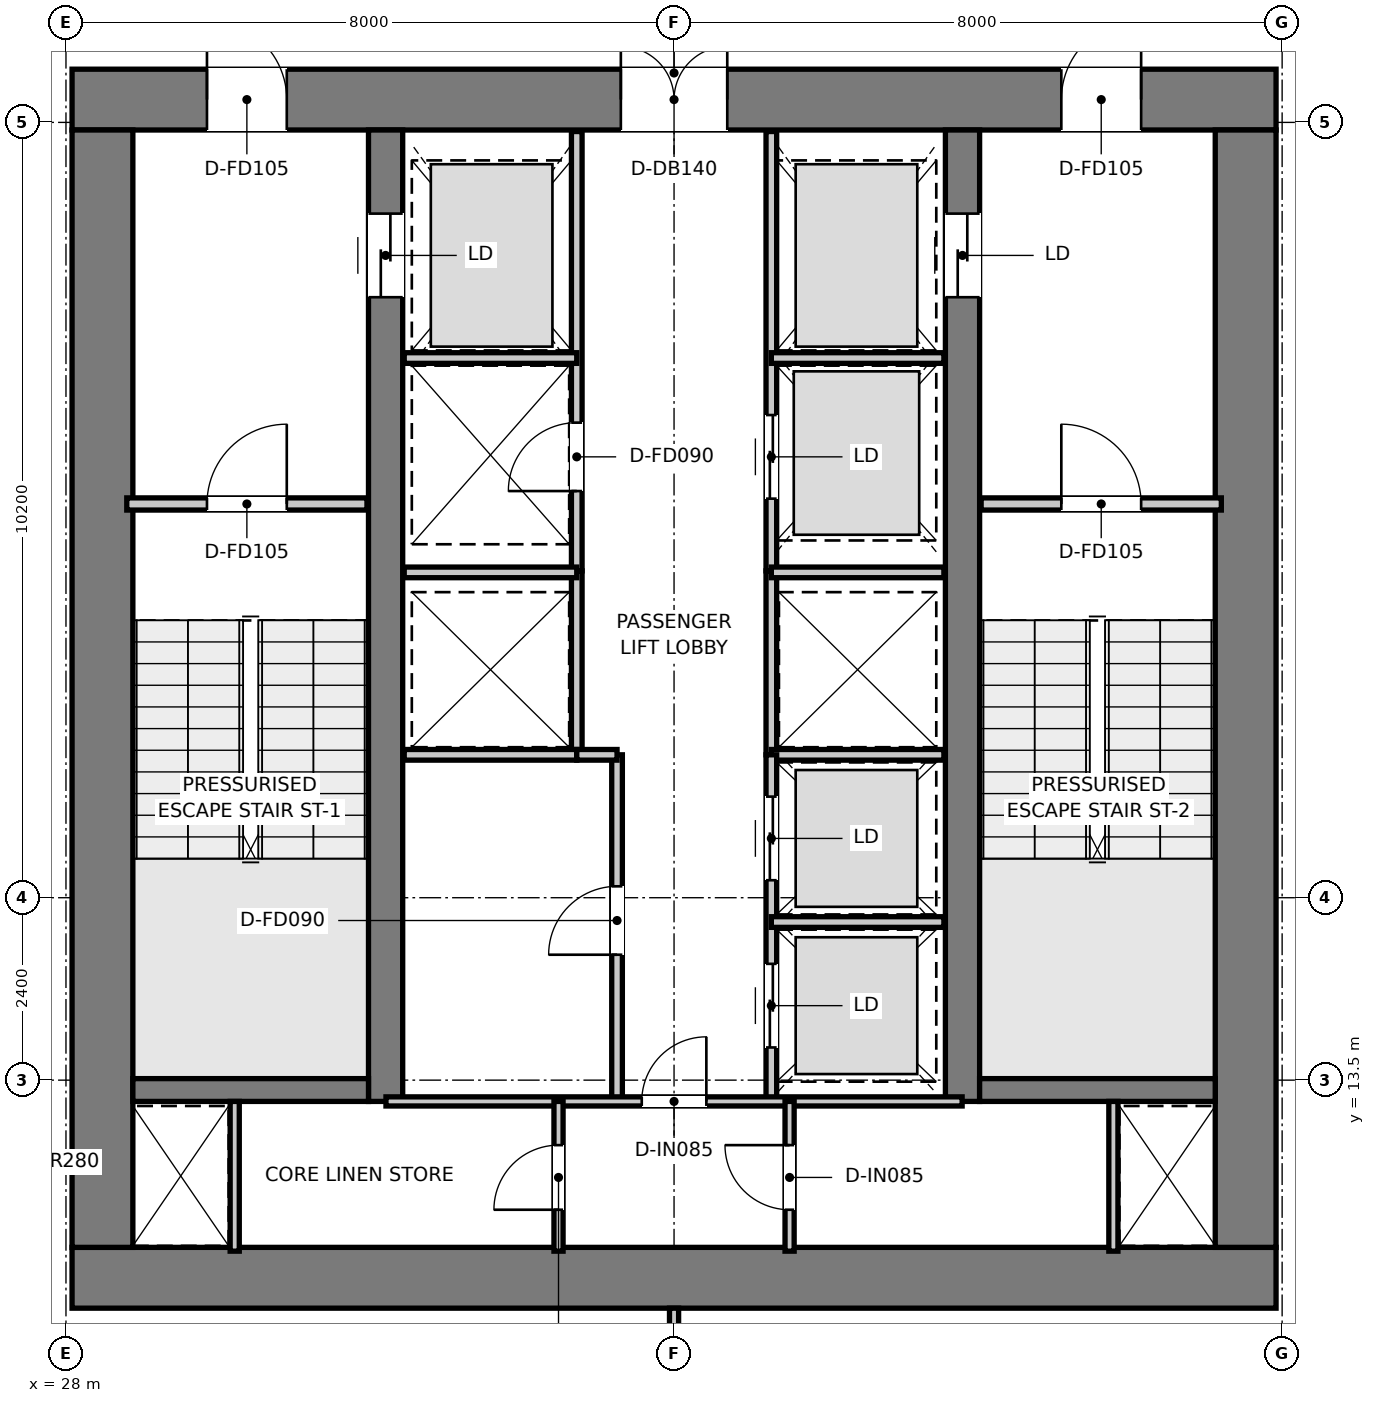
"""IFC4 building model, lengths in metres.
Left out: names, types, materials, properties, quantities, classifications, styles, units other than length and angle.
Written with IfcOpenShell. Run it as: python <this file> out.ifc"""

import sys

from ifc_helpers import new_model, si_unit, direction, frame, frame_2d, origin, place, context, subcontext, project, spatial, rectangle, extrude, element, fill, save


model = new_model("IFC4")
c1 = context("Model", 3, precision=1e-05, world=origin(), true_north=direction((0.0, 1.0)))
c2 = subcontext(c1, "Body", "Model", "MODEL_VIEW")
j1 = project(units=[si_unit("LENGTHUNIT", "METRE"), si_unit("PLANEANGLEUNIT", "RADIAN")], contexts=[c1])
p1 = place(None, origin())
s1 = spatial("IfcSite", under=j1, at=p1, CompositionType="ELEMENT")
p2 = place(p1, origin())
s2 = spatial("IfcBuilding", under=s1, at=p2, CompositionType="ELEMENT")
p3 = place(p2, frame((0.0, 0.0, 207.3)))
s3 = spatial("IfcBuildingStorey", under=s2, at=p3, CompositionType="ELEMENT", Elevation=207.3)
p4 = place(p3, frame((28.08, 10.9, 0.0), z_axis=(0.0, 0.0, 1.0), x_axis=(1.0, 0.0, 0.0)))
e1 = element("IfcWall", 1, at=p4, inside=s3, PredefinedType="SHEAR", context=c2, shape_type="SweptSolid", body=[
    extrude(rectangle(XDim=15.84, YDim=0.8, at=frame_2d((7.92, 0.0))), origin(), (0.0, 0.0, 1.0), 3.95),
])
p5 = place(p3, frame((28.08, 26.4, 0.0), z_axis=(0.0, 0.0, 1.0), x_axis=(1.0, 0.0, 0.0)))
e2 = element("IfcWall", 2, at=p5, inside=s3, PredefinedType="SHEAR", context=c2, shape_type="SweptSolid", body=[
    extrude(rectangle(XDim=15.84, YDim=0.8, at=frame_2d((7.92, 0.0))), origin(), (0.0, 0.0, 1.0), 3.95),
])
p6 = place(p5, frame((7.22, 0.0, 0.0)))
e3 = element("IfcOpeningElement", 3, at=p6, cuts=e2, PredefinedType="OPENING", context=c2, shape_type="SweptSolid", body=[
    extrude(rectangle(XDim=1.4, YDim=2.2, at=frame_2d((0.7, 1.1))), frame((0.0, 0.41, 0.0), z_axis=(0.0, -1.0, 0.0), x_axis=(1.0, 0.0, 0.0)), (0.0, 0.0, 1.0), 0.82),
])
p7 = place(p5, frame((1.775, 0.0, 0.0)))
e4 = element("IfcOpeningElement", 4, at=p7, cuts=e2, PredefinedType="OPENING", context=c2, shape_type="SweptSolid", body=[
    extrude(rectangle(XDim=1.05, YDim=2.1, at=frame_2d((0.525, 1.05))), frame((0.0, 0.41, 0.0), z_axis=(0.0, -1.0, 0.0), x_axis=(1.0, 0.0, 0.0)), (0.0, 0.0, 1.0), 0.82),
])
p8 = place(p5, frame((13.015, 0.0, 0.0)))
e5 = element("IfcOpeningElement", 5, at=p8, cuts=e2, PredefinedType="OPENING", context=c2, shape_type="SweptSolid", body=[
    extrude(rectangle(XDim=1.05, YDim=2.1, at=frame_2d((0.525, 1.05))), frame((0.0, 0.41, 0.0), z_axis=(0.0, -1.0, 0.0), x_axis=(1.0, 0.0, 0.0)), (0.0, 0.0, 1.0), 0.82),
])
for number, where, z_axis, x_axis in (
    (6, (28.48, 11.3, 0.0), (0.0, 0.0, 1.0), (0.0, 1.0, 0.0)),
    (7, (43.52, 11.3, 0.0), (0.0, 0.0, 1.0), (0.0, 1.0, 0.0)),
):
    element("IfcWall", number, at=place(p3, frame(where, z_axis=z_axis, x_axis=x_axis)), inside=s3, PredefinedType="SHEAR", context=c2, shape_type="SweptSolid", body=[
        extrude(rectangle(XDim=14.7, YDim=0.8, at=frame_2d((7.35, 0.0))), origin(), (0.0, 0.0, 1.0), 3.95),
    ])
p9 = place(p3, frame((32.205, 13.22, 0.0), z_axis=(0.0, 0.0, 1.0), x_axis=(0.0, 1.0, 0.0)))
e8 = element("IfcWall", 8, at=p9, inside=s3, PredefinedType="SHEAR", context=c2, shape_type="SweptSolid", body=[
    extrude(rectangle(XDim=12.78, YDim=0.45, at=frame_2d((6.39, 0.0))), origin(), (0.0, 0.0, 1.0), 3.95),
])
p10 = place(p9, frame((10.58, 0.0, 0.0)))
e9 = element("IfcOpeningElement", 9, at=p10, cuts=e8, PredefinedType="OPENING", context=c2, shape_type="SweptSolid", body=[
    extrude(rectangle(XDim=1.1, YDim=2.15, at=frame_2d((0.55, 1.075))), frame((0.0, 0.235, 0.0), z_axis=(0.0, -1.0, 0.0), x_axis=(1.0, 0.0, 0.0)), (0.0, 0.0, 1.0), 0.47),
])
p11 = place(p3, frame((39.795, 13.22, 0.0), z_axis=(0.0, 0.0, 1.0), x_axis=(0.0, 1.0, 0.0)))
e10 = element("IfcWall", 10, at=p11, inside=s3, PredefinedType="SHEAR", context=c2, shape_type="SweptSolid", body=[
    extrude(rectangle(XDim=12.78, YDim=0.45, at=frame_2d((6.39, 0.0))), origin(), (0.0, 0.0, 1.0), 3.95),
])
p12 = place(p11, frame((10.58, 0.0, 0.0)))
e11 = element("IfcOpeningElement", 11, at=p12, cuts=e10, PredefinedType="OPENING", context=c2, shape_type="SweptSolid", body=[
    extrude(rectangle(XDim=1.1, YDim=2.15, at=frame_2d((0.55, 1.075))), frame((0.0, 0.235, 0.0), z_axis=(0.0, -1.0, 0.0), x_axis=(1.0, 0.0, 0.0)), (0.0, 0.0, 1.0), 0.47),
])
for number, where, z_axis, x_axis in (
    (12, (28.88, 13.37, 0.0), (0.0, 0.0, 1.0), (1.0, 0.0, 0.0)),
    (13, (40.02, 13.37, 0.0), (0.0, 0.0, 1.0), (1.0, 0.0, 0.0)),
):
    element("IfcWall", number, at=place(p3, frame(where, z_axis=z_axis, x_axis=x_axis)), inside=s3, PredefinedType="SHEAR", context=c2, shape_type="SweptSolid", body=[
        extrude(rectangle(XDim=3.1, YDim=0.3, at=frame_2d((1.55, 0.0))), origin(), (0.0, 0.0, 1.0), 3.95),
    ])
p13 = place(p3, frame((28.8, 21.08, 0.0), z_axis=(0.0, 0.0, 1.0), x_axis=(1.0, 0.0, 0.0)))
e14 = element("IfcWall", 14, at=p13, inside=s3, PredefinedType="PARTITIONING", context=c2, shape_type="SweptSolid", body=[
    extrude(rectangle(XDim=3.16, YDim=0.16, at=frame_2d((1.58, 0.0))), origin(), (0.0, 0.0, 1.0), 3.67),
])
p14 = place(p13, frame((1.055, 0.0, 0.0)))
e15 = element("IfcOpeningElement", 15, at=p14, cuts=e14, PredefinedType="OPENING", context=c2, shape_type="SweptSolid", body=[
    extrude(rectangle(XDim=1.05, YDim=2.1, at=frame_2d((0.525, 1.05))), frame((0.0, 0.09, 0.0), z_axis=(0.0, -1.0, 0.0), x_axis=(1.0, 0.0, 0.0)), (0.0, 0.0, 1.0), 0.18),
])
p15 = place(p3, frame((40.04, 21.08, 0.0), z_axis=(0.0, 0.0, 1.0), x_axis=(1.0, 0.0, 0.0)))
e16 = element("IfcWall", 16, at=p15, inside=s3, PredefinedType="PARTITIONING", context=c2, shape_type="SweptSolid", body=[
    extrude(rectangle(XDim=3.16, YDim=0.16, at=frame_2d((1.58, 0.0))), origin(), (0.0, 0.0, 1.0), 3.67),
])
p16 = place(p15, frame((1.055, 0.0, 0.0)))
e17 = element("IfcOpeningElement", 17, at=p16, cuts=e16, PredefinedType="OPENING", context=c2, shape_type="SweptSolid", body=[
    extrude(rectangle(XDim=1.05, YDim=2.1, at=frame_2d((0.525, 1.05))), frame((0.0, 0.09, 0.0), z_axis=(0.0, -1.0, 0.0), x_axis=(1.0, 0.0, 0.0)), (0.0, 0.0, 1.0), 0.18),
])
p17 = place(p3, frame((34.72, 20.2, 0.0), z_axis=(0.0, 0.0, 1.0), x_axis=(0.0, 1.0, 0.0)))
e18 = element("IfcWall", 18, at=p17, inside=s3, PredefinedType="PARTITIONING", context=c2, shape_type="SweptSolid", body=[
    extrude(rectangle(XDim=5.78, YDim=0.14, at=frame_2d((2.89, 0.0))), origin(), (0.0, 0.0, 1.0), 2.67),
])
p18 = place(p17, frame((1.05, 0.0, 0.0)))
e19 = element("IfcOpeningElement", 19, at=p18, cuts=e18, PredefinedType="OPENING", context=c2, shape_type="SweptSolid", body=[
    extrude(rectangle(XDim=0.9, YDim=2.1, at=frame_2d((0.45, 1.05))), frame((0.0, 0.08, 0.0), z_axis=(0.0, -1.0, 0.0), x_axis=(1.0, 0.0, 0.0)), (0.0, 0.0, 1.0), 0.16),
])
p19 = place(p3, frame((37.28, 20.2, 0.0), z_axis=(0.0, 0.0, 1.0), x_axis=(0.0, 1.0, 0.0)))
e20 = element("IfcWall", 20, at=p19, inside=s3, PredefinedType="PARTITIONING", context=c2, shape_type="SweptSolid", body=[
    extrude(rectangle(XDim=5.78, YDim=0.14, at=frame_2d((2.89, 0.0))), origin(), (0.0, 0.0, 1.0), 2.67),
])
p20 = place(p19, frame((0.95, 0.0, 0.0)))
e21 = element("IfcOpeningElement", 21, at=p20, cuts=e20, PredefinedType="OPENING", context=c2, shape_type="SweptSolid", body=[
    extrude(rectangle(XDim=1.1, YDim=2.15, at=frame_2d((0.55, 1.075))), frame((0.0, 0.08, 0.0), z_axis=(0.0, -1.0, 0.0), x_axis=(1.0, 0.0, 0.0)), (0.0, 0.0, 1.0), 0.16),
])
for number, where, z_axis, x_axis in (
    (22, (32.45, 23.0, 0.0), (0.0, 0.0, 1.0), (1.0, 0.0, 0.0)),
    (23, (37.28, 23.0, 0.0), (0.0, 0.0, 1.0), (1.0, 0.0, 0.0)),
):
    element("IfcWall", number, at=place(p3, frame(where, z_axis=z_axis, x_axis=x_axis)), inside=s3, PredefinedType="PARTITIONING", context=c2, shape_type="SweptSolid", body=[
        extrude(rectangle(XDim=2.27, YDim=0.14, at=frame_2d((1.135, 0.0))), origin(), (0.0, 0.0, 1.0), 2.67),
    ])
for number, where, z_axis, x_axis in (
    (24, (34.72, 17.78, 0.0), (0.0, 0.0, 1.0), (0.0, 1.0, 0.0)),
    (25, (37.28, 17.78, 0.0), (0.0, 0.0, 1.0), (0.0, 1.0, 0.0)),
):
    element("IfcWall", number, at=place(p3, frame(where, z_axis=z_axis, x_axis=x_axis)), inside=s3, PredefinedType="PARTITIONING", context=c2, shape_type="SweptSolid", body=[
        extrude(rectangle(XDim=2.42, YDim=0.14, at=frame_2d((1.21, 0.0))), origin(), (0.0, 0.0, 1.0), 3.67),
    ])
for number, where, z_axis, x_axis in (
    (26, (32.45, 17.78, 0.0), (0.0, 0.0, 1.0), (1.0, 0.0, 0.0)),
    (27, (32.45, 20.18, 0.0), (0.0, 0.0, 1.0), (1.0, 0.0, 0.0)),
    (28, (37.28, 17.78, 0.0), (0.0, 0.0, 1.0), (1.0, 0.0, 0.0)),
    (29, (37.28, 20.18, 0.0), (0.0, 0.0, 1.0), (1.0, 0.0, 0.0)),
):
    element("IfcWall", number, at=place(p3, frame(where, z_axis=z_axis, x_axis=x_axis)), inside=s3, PredefinedType="PARTITIONING", context=c2, shape_type="SweptSolid", body=[
        extrude(rectangle(XDim=2.27, YDim=0.14, at=frame_2d((1.135, 0.0))), origin(), (0.0, 0.0, 1.0), 3.67),
    ])
p21 = place(p3, frame((35.25, 13.22, 0.0), z_axis=(0.0, 0.0, 1.0), x_axis=(0.0, 1.0, 0.0)))
e30 = element("IfcWall", 30, at=p21, inside=s3, PredefinedType="PARTITIONING", context=c2, shape_type="SweptSolid", body=[
    extrude(rectangle(XDim=4.56, YDim=0.14, at=frame_2d((2.28, 0.0))), origin(), (0.0, 0.0, 1.0), 3.67),
])
p22 = place(p21, frame((1.93, 0.0, 0.0)))
e31 = element("IfcOpeningElement", 31, at=p22, cuts=e30, PredefinedType="OPENING", context=c2, shape_type="SweptSolid", body=[
    extrude(rectangle(XDim=0.9, YDim=2.1, at=frame_2d((0.45, 1.05))), frame((0.0, 0.08, 0.0), z_axis=(0.0, -1.0, 0.0), x_axis=(1.0, 0.0, 0.0)), (0.0, 0.0, 1.0), 0.16),
])
p23 = place(p3, frame((34.72, 17.78, 0.0), z_axis=(0.0, 0.0, 1.0), x_axis=(1.0, 0.0, 0.0)))
e32 = element("IfcWall", 32, at=p23, inside=s3, PredefinedType="PARTITIONING", context=c2, shape_type="SweptSolid", body=[
    extrude(rectangle(XDim=0.53, YDim=0.14, at=frame_2d((0.265, 0.0))), origin(), (0.0, 0.0, 1.0), 3.67),
])
p24 = place(p3, frame((37.28, 13.22, 0.0), z_axis=(0.0, 0.0, 1.0), x_axis=(0.0, 1.0, 0.0)))
e33 = element("IfcWall", 33, at=p24, inside=s3, PredefinedType="PARTITIONING", context=c2, shape_type="SweptSolid", body=[
    extrude(rectangle(XDim=4.56, YDim=0.14, at=frame_2d((2.28, 0.0))), origin(), (0.0, 0.0, 1.0), 3.67),
])
p25 = place(p24, frame((0.71, 0.0, 0.0)))
e34 = element("IfcOpeningElement", 34, at=p25, cuts=e33, PredefinedType="OPENING", context=c2, shape_type="SweptSolid", body=[
    extrude(rectangle(XDim=1.1, YDim=2.15, at=frame_2d((0.55, 1.075))), frame((0.0, 0.08, 0.0), z_axis=(0.0, -1.0, 0.0), x_axis=(1.0, 0.0, 0.0)), (0.0, 0.0, 1.0), 0.16),
])
p26 = place(p24, frame((2.91, 0.0, 0.0)))
e35 = element("IfcOpeningElement", 35, at=p26, cuts=e33, PredefinedType="OPENING", context=c2, shape_type="SweptSolid", body=[
    extrude(rectangle(XDim=1.1, YDim=2.15, at=frame_2d((0.55, 1.075))), frame((0.0, 0.08, 0.0), z_axis=(0.0, -1.0, 0.0), x_axis=(1.0, 0.0, 0.0)), (0.0, 0.0, 1.0), 0.16),
])
p27 = place(p3, frame((37.28, 15.58, 0.0), z_axis=(0.0, 0.0, 1.0), x_axis=(1.0, 0.0, 0.0)))
e36 = element("IfcWall", 36, at=p27, inside=s3, PredefinedType="PARTITIONING", context=c2, shape_type="SweptSolid", body=[
    extrude(rectangle(XDim=2.27, YDim=0.14, at=frame_2d((1.135, 0.0))), origin(), (0.0, 0.0, 1.0), 3.67),
])
for number, where, z_axis, x_axis in (
    (37, (30.22, 11.25, 0.0), (0.0, 0.0, 1.0), (0.0, 1.0, 0.0)),
    (38, (41.78, 11.25, 0.0), (0.0, 0.0, 1.0), (0.0, 1.0, 0.0)),
):
    element("IfcWall", number, at=place(p3, frame(where, z_axis=z_axis, x_axis=x_axis)), inside=s3, PredefinedType="PARTITIONING", context=c2, shape_type="SweptSolid", body=[
        extrude(rectangle(XDim=1.97, YDim=0.12, at=frame_2d((0.985, 0.0))), origin(), (0.0, 0.0, 1.0), 3.67),
    ])
p28 = place(p3, frame((32.21, 13.22, 0.0), z_axis=(0.0, 0.0, 1.0), x_axis=(1.0, 0.0, 0.0)))
e39 = element("IfcWall", 39, at=p28, inside=s3, PredefinedType="PARTITIONING", context=c2, shape_type="SweptSolid", body=[
    extrude(rectangle(XDim=7.58, YDim=0.12, at=frame_2d((3.79, 0.0))), origin(), (0.0, 0.0, 1.0), 3.67),
])
p29 = place(p28, frame((3.365, 0.0, 0.0)))
e40 = element("IfcOpeningElement", 40, at=p29, cuts=e39, PredefinedType="OPENING", context=c2, shape_type="SweptSolid", body=[
    extrude(rectangle(XDim=0.85, YDim=2.1, at=frame_2d((0.425, 1.05))), frame((0.0, 0.07, 0.0), z_axis=(0.0, -1.0, 0.0), x_axis=(1.0, 0.0, 0.0)), (0.0, 0.0, 1.0), 0.14),
])
p30 = place(p3, frame((34.48, 11.25, 0.0), z_axis=(0.0, 0.0, 1.0), x_axis=(0.0, 1.0, 0.0)))
e41 = element("IfcWall", 41, at=p30, inside=s3, PredefinedType="PARTITIONING", context=c2, shape_type="SweptSolid", body=[
    extrude(rectangle(XDim=1.97, YDim=0.12, at=frame_2d((0.985, 0.0))), origin(), (0.0, 0.0, 1.0), 3.67),
])
p31 = place(p30, frame((0.545, 0.0, 0.0)))
e42 = element("IfcOpeningElement", 42, at=p31, cuts=e41, PredefinedType="OPENING", context=c2, shape_type="SweptSolid", body=[
    extrude(rectangle(XDim=0.85, YDim=2.1, at=frame_2d((0.425, 1.05))), frame((0.0, 0.07, 0.0), z_axis=(0.0, -1.0, 0.0), x_axis=(1.0, 0.0, 0.0)), (0.0, 0.0, 1.0), 0.14),
])
p32 = place(p3, frame((37.52, 11.25, 0.0), z_axis=(0.0, 0.0, 1.0), x_axis=(0.0, 1.0, 0.0)))
e43 = element("IfcWall", 43, at=p32, inside=s3, PredefinedType="PARTITIONING", context=c2, shape_type="SweptSolid", body=[
    extrude(rectangle(XDim=1.97, YDim=0.12, at=frame_2d((0.985, 0.0))), origin(), (0.0, 0.0, 1.0), 3.67),
])
p33 = place(p32, frame((0.545, 0.0, 0.0)))
e44 = element("IfcOpeningElement", 44, at=p33, cuts=e43, PredefinedType="OPENING", context=c2, shape_type="SweptSolid", body=[
    extrude(rectangle(XDim=0.85, YDim=2.1, at=frame_2d((0.425, 1.05))), frame((0.0, 0.07, 0.0), z_axis=(0.0, -1.0, 0.0), x_axis=(1.0, 0.0, 0.0)), (0.0, 0.0, 1.0), 0.14),
])
p34 = place(p3, frame((36.0, 3.12, 0.0), z_axis=(0.0, 0.0, 1.0), x_axis=(0.0, 1.0, 0.0)))
e45 = element("IfcWall", 45, at=p34, inside=s3, PredefinedType="PARTITIONING", context=c2, shape_type="SweptSolid", body=[
    extrude(rectangle(XDim=7.38, YDim=0.12, at=frame_2d((3.69, 0.0))), origin(), (0.0, 0.0, 1.0), 3.67),
])
p35 = place(p14, origin())
e46 = element("IfcDoor", 46, at=p35, inside=s3, OperationType="SINGLE_SWING_RIGHT", PredefinedType="DOOR", context=c2, shape_type="SweptSolid", body=[
    extrude(rectangle(XDim=1.05, YDim=2.1, at=frame_2d((0.525, 1.05))), frame((0.0, 0.025, 0.0), z_axis=(0.0, -1.0, 0.0), x_axis=(1.0, 0.0, 0.0)), (0.0, 0.0, 1.0), 0.05),
])
fill(e15, e46)
p36 = place(p16, origin())
e47 = element("IfcDoor", 47, at=p36, inside=s3, OperationType="SINGLE_SWING_LEFT", PredefinedType="DOOR", context=c2, shape_type="SweptSolid", body=[
    extrude(rectangle(XDim=1.05, YDim=2.1, at=frame_2d((0.525, 1.05))), frame((0.0, 0.025, 0.0), z_axis=(0.0, -1.0, 0.0), x_axis=(1.0, 0.0, 0.0)), (0.0, 0.0, 1.0), 0.05),
])
fill(e17, e47)
p37 = place(p6, origin())
e48 = element("IfcDoor", 48, at=p37, inside=s3, OperationType="DOUBLE_DOOR_SINGLE_SWING", PredefinedType="DOOR", context=c2, shape_type="SweptSolid", body=[
    extrude(rectangle(XDim=1.4, YDim=2.2, at=frame_2d((0.7, 1.1))), frame((0.0, 0.025, 0.0), z_axis=(0.0, -1.0, 0.0), x_axis=(1.0, 0.0, 0.0)), (0.0, 0.0, 1.0), 0.05),
])
fill(e3, e48)
p38 = place(p7, origin())
e49 = element("IfcDoor", 49, at=p38, inside=s3, OperationType="SINGLE_SWING_LEFT", PredefinedType="DOOR", context=c2, shape_type="SweptSolid", body=[
    extrude(rectangle(XDim=1.05, YDim=2.1, at=frame_2d((0.525, 1.05))), frame((0.0, 0.025, 0.0), z_axis=(0.0, -1.0, 0.0), x_axis=(1.0, 0.0, 0.0)), (0.0, 0.0, 1.0), 0.05),
])
fill(e4, e49)
p39 = place(p8, origin())
e50 = element("IfcDoor", 50, at=p39, inside=s3, OperationType="SINGLE_SWING_RIGHT", PredefinedType="DOOR", context=c2, shape_type="SweptSolid", body=[
    extrude(rectangle(XDim=1.05, YDim=2.1, at=frame_2d((0.525, 1.05))), frame((0.0, 0.025, 0.0), z_axis=(0.0, -1.0, 0.0), x_axis=(1.0, 0.0, 0.0)), (0.0, 0.0, 1.0), 0.05),
])
fill(e5, e50)
p40 = place(p10, origin())
e51 = element("IfcDoor", 51, at=p40, inside=s3, OperationType="DOUBLE_DOOR_SLIDING", PredefinedType="DOOR", context=c2, shape_type="SweptSolid", body=[
    extrude(rectangle(XDim=1.1, YDim=2.15, at=frame_2d((0.55, 1.075))), frame((0.0, 0.025, 0.0), z_axis=(0.0, -1.0, 0.0), x_axis=(1.0, 0.0, 0.0)), (0.0, 0.0, 1.0), 0.05),
])
fill(e9, e51)
p41 = place(p12, origin())
e52 = element("IfcDoor", 52, at=p41, inside=s3, OperationType="DOUBLE_DOOR_SLIDING", PredefinedType="DOOR", context=c2, shape_type="SweptSolid", body=[
    extrude(rectangle(XDim=1.1, YDim=2.15, at=frame_2d((0.55, 1.075))), frame((0.0, 0.025, 0.0), z_axis=(0.0, -1.0, 0.0), x_axis=(1.0, 0.0, 0.0)), (0.0, 0.0, 1.0), 0.05),
])
fill(e11, e52)
p42 = place(p18, origin())
e53 = element("IfcDoor", 53, at=p42, inside=s3, OperationType="SINGLE_SWING_LEFT", PredefinedType="DOOR", context=c2, shape_type="SweptSolid", body=[
    extrude(rectangle(XDim=0.9, YDim=2.1, at=frame_2d((0.45, 1.05))), frame((0.0, 0.025, 0.0), z_axis=(0.0, -1.0, 0.0), x_axis=(1.0, 0.0, 0.0)), (0.0, 0.0, 1.0), 0.05),
])
fill(e19, e53)
p43 = place(p20, origin())
e54 = element("IfcDoor", 54, at=p43, inside=s3, OperationType="DOUBLE_DOOR_SLIDING", PredefinedType="DOOR", context=c2, shape_type="SweptSolid", body=[
    extrude(rectangle(XDim=1.1, YDim=2.15, at=frame_2d((0.55, 1.075))), frame((0.0, 0.025, 0.0), z_axis=(0.0, -1.0, 0.0), x_axis=(1.0, 0.0, 0.0)), (0.0, 0.0, 1.0), 0.05),
])
fill(e21, e54)
p44 = place(p22, origin())
e55 = element("IfcDoor", 55, at=p44, inside=s3, OperationType="SINGLE_SWING_LEFT", PredefinedType="DOOR", context=c2, shape_type="SweptSolid", body=[
    extrude(rectangle(XDim=0.9, YDim=2.1, at=frame_2d((0.45, 1.05))), frame((0.0, 0.025, 0.0), z_axis=(0.0, -1.0, 0.0), x_axis=(1.0, 0.0, 0.0)), (0.0, 0.0, 1.0), 0.05),
])
fill(e31, e55)
p45 = place(p25, origin())
e56 = element("IfcDoor", 56, at=p45, inside=s3, OperationType="DOUBLE_DOOR_SLIDING", PredefinedType="DOOR", context=c2, shape_type="SweptSolid", body=[
    extrude(rectangle(XDim=1.1, YDim=2.15, at=frame_2d((0.55, 1.075))), frame((0.0, 0.025, 0.0), z_axis=(0.0, -1.0, 0.0), x_axis=(1.0, 0.0, 0.0)), (0.0, 0.0, 1.0), 0.05),
])
fill(e34, e56)
p46 = place(p26, origin())
e57 = element("IfcDoor", 57, at=p46, inside=s3, OperationType="DOUBLE_DOOR_SLIDING", PredefinedType="DOOR", context=c2, shape_type="SweptSolid", body=[
    extrude(rectangle(XDim=1.1, YDim=2.15, at=frame_2d((0.55, 1.075))), frame((0.0, 0.025, 0.0), z_axis=(0.0, -1.0, 0.0), x_axis=(1.0, 0.0, 0.0)), (0.0, 0.0, 1.0), 0.05),
])
fill(e35, e57)
p47 = place(p29, origin())
e58 = element("IfcDoor", 58, at=p47, inside=s3, OperationType="SINGLE_SWING_RIGHT", PredefinedType="DOOR", context=c2, shape_type="SweptSolid", body=[
    extrude(rectangle(XDim=0.85, YDim=2.1, at=frame_2d((0.425, 1.05))), frame((0.0, 0.025, 0.0), z_axis=(0.0, -1.0, 0.0), x_axis=(1.0, 0.0, 0.0)), (0.0, 0.0, 1.0), 0.05),
])
fill(e40, e58)
p48 = place(p31, origin())
e59 = element("IfcDoor", 59, at=p48, inside=s3, OperationType="SINGLE_SWING_LEFT", PredefinedType="DOOR", context=c2, shape_type="SweptSolid", body=[
    extrude(rectangle(XDim=0.85, YDim=2.1, at=frame_2d((0.425, 1.05))), frame((0.0, 0.025, 0.0), z_axis=(0.0, -1.0, 0.0), x_axis=(1.0, 0.0, 0.0)), (0.0, 0.0, 1.0), 0.05),
])
fill(e42, e59)
p49 = place(p33, origin())
e60 = element("IfcDoor", 60, at=p49, inside=s3, OperationType="SINGLE_SWING_RIGHT", PredefinedType="DOOR", context=c2, shape_type="SweptSolid", body=[
    extrude(rectangle(XDim=0.85, YDim=2.1, at=frame_2d((0.425, 1.05))), frame((0.0, 0.025, 0.0), z_axis=(0.0, -1.0, 0.0), x_axis=(1.0, 0.0, 0.0)), (0.0, 0.0, 1.0), 0.05),
])
fill(e44, e60)
save(model, sys.argv[1])
